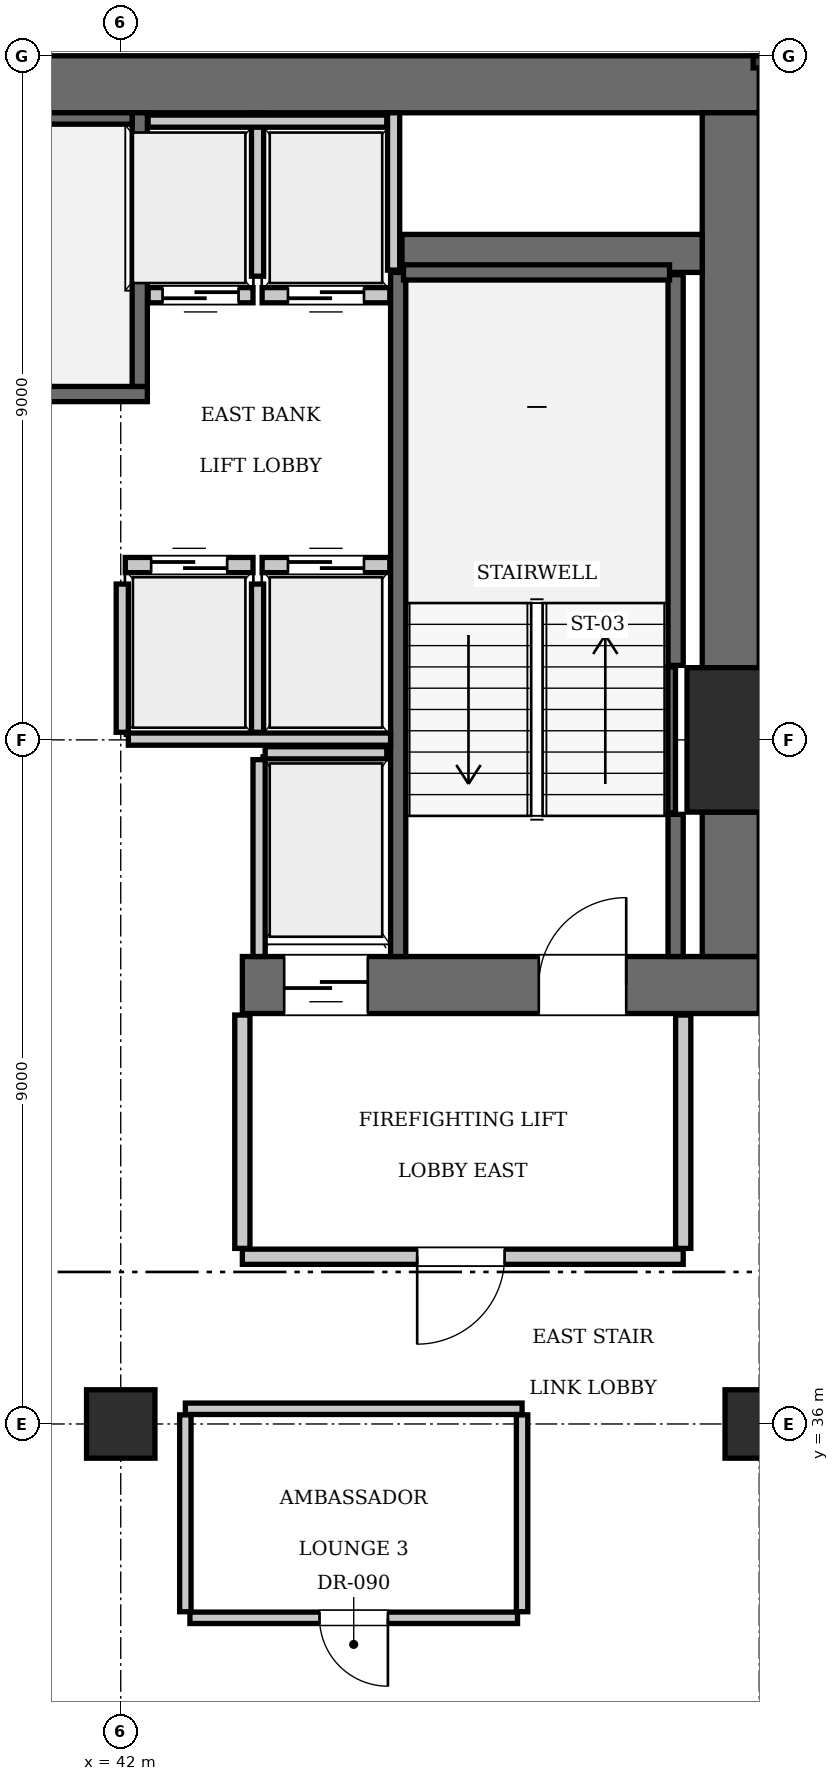
"""IFC4 building model, lengths in metres.
Left out: names, types, materials, properties, quantities, classifications, styles, units other than length and angle.
Written with IfcOpenShell. Run it as: python <this file> out.ifc"""

import sys

from ifc_helpers import new_model, si_unit, direction, frame, frame_2d, origin, origin_2d, place, context, subcontext, project, spatial, rectangle, extrude, element, fill, save


model = new_model("IFC4")
c1 = context("Model", 3, precision=1e-05, world=origin(), true_north=direction((0.0, 1.0)))
c2 = subcontext(c1, "Body", "Model", "MODEL_VIEW")
j1 = project(units=[si_unit("LENGTHUNIT", "METRE"), si_unit("PLANEANGLEUNIT", "RADIAN")], contexts=[c1])
p1 = place(None, origin())
s1 = spatial("IfcSite", under=j1, at=p1, CompositionType="ELEMENT")
p2 = place(p1, origin())
s2 = spatial("IfcBuilding", under=s1, at=p2, CompositionType="ELEMENT")
p3 = place(p2, frame((0.0, 0.0, 219.8)))
s3 = spatial("IfcBuildingStorey", under=s2, at=p3, CompositionType="ELEMENT", Elevation=219.8)
p4 = place(p3, frame((50.4, 45.0, 0.0), z_axis=(0.0, 0.0, 1.0), x_axis=(1.0, 0.0, 0.0)))
e1 = element("IfcColumn", 1, at=p4, inside=s3, PredefinedType="COLUMN", context=c2, shape_type="SweptSolid", body=[
    extrude(rectangle(XDim=1.9, YDim=1.9, at=origin_2d()), origin(), (0.0, 0.0, 1.0), 3.85),
])
p5 = place(p3, frame((25.2, 53.625, 0.0), z_axis=(0.0, 0.0, 1.0), x_axis=(1.0, 0.0, 0.0)))
e2 = element("IfcWall", 2, at=p5, inside=s3, PredefinedType="SHEAR", context=c2, shape_type="SweptSolid", body=[
    extrude(rectangle(XDim=25.2, YDim=0.75, at=frame_2d((12.6, 0.0))), origin(), (0.0, 0.0, 1.0), 3.85),
])
p6 = place(p3, frame((43.6, 41.775, 0.0), z_axis=(0.0, 0.0, 1.0), x_axis=(1.0, 0.0, 0.0)))
e3 = element("IfcWall", 3, at=p6, inside=s3, PredefinedType="SHEAR", context=c2, shape_type="SweptSolid", body=[
    extrude(rectangle(XDim=6.8, YDim=0.75, at=frame_2d((3.4, 0.0))), origin(), (0.0, 0.0, 1.0), 3.85),
])
p7 = place(p6, frame((3.9, 0.0, 0.0)))
e4 = element("IfcOpeningElement", 4, at=p7, cuts=e3, PredefinedType="OPENING", context=c2, shape_type="SweptSolid", body=[
    extrude(rectangle(XDim=1.15, YDim=2.15, at=frame_2d((0.575, 1.075))), frame((0.0, 0.385, 0.0), z_axis=(0.0, -1.0, 0.0), x_axis=(1.0, 0.0, 0.0)), (0.0, 0.0, 1.0), 0.77),
])
p8 = place(p6, frame((0.55, 0.0, 0.0)))
e5 = element("IfcOpeningElement", 5, at=p8, cuts=e3, PredefinedType="OPENING", context=c2, shape_type="SweptSolid", body=[
    extrude(rectangle(XDim=1.1, YDim=2.2, at=frame_2d((0.55, 1.1))), frame((0.0, 0.385, 0.0), z_axis=(0.0, -1.0, 0.0), x_axis=(1.0, 0.0, 0.0)), (0.0, 0.0, 1.0), 0.77),
])
p9 = place(p3, frame((50.025, 42.15, 0.0), z_axis=(0.0, 0.0, 1.0), x_axis=(0.0, 1.0, 0.0)))
e6 = element("IfcWall", 6, at=p9, inside=s3, PredefinedType="SHEAR", context=c2, shape_type="SweptSolid", body=[
    extrude(rectangle(XDim=1.9, YDim=0.75, at=frame_2d((0.95, 0.0))), origin(), (0.0, 0.0, 1.0), 3.85),
])
p10 = place(p3, frame((50.025, 45.95, 0.0), z_axis=(0.0, 0.0, 1.0), x_axis=(0.0, 1.0, 0.0)))
e7 = element("IfcWall", 7, at=p10, inside=s3, PredefinedType="SHEAR", context=c2, shape_type="SweptSolid", body=[
    extrude(rectangle(XDim=7.3, YDim=0.75, at=frame_2d((3.65, 0.0))), origin(), (0.0, 0.0, 1.0), 3.85),
])
p11 = place(p3, frame((45.7, 51.4, 0.0), z_axis=(0.0, 0.0, 1.0), x_axis=(1.0, 0.0, 0.0)))
e8 = element("IfcWall", 8, at=p11, inside=s3, PredefinedType="SHEAR", context=c2, shape_type="SweptSolid", body=[
    extrude(rectangle(XDim=3.95, YDim=0.5, at=frame_2d((1.975, 0.0))), origin(), (0.0, 0.0, 1.0), 3.85),
])
for number, where, z_axis, x_axis in (
    (9, (42.0, 36.0, 0.0), (0.0, 0.0, 1.0), (1.0, 0.0, 0.0)),
    (10, (50.4, 36.0, 0.0), (0.0, 0.0, 1.0), (1.0, 0.0, 0.0)),
):
    element("IfcColumn", number, at=place(p3, frame(where, z_axis=z_axis, x_axis=x_axis)), inside=s3, PredefinedType="COLUMN", context=c2, shape_type="SweptSolid", body=[
        extrude(rectangle(XDim=0.9, YDim=0.9, at=origin_2d()), origin(), (0.0, 0.0, 1.0), 3.85),
    ])
p12 = place(p3, frame((33.25, 49.55, 0.0), z_axis=(0.0, 0.0, 1.0), x_axis=(1.0, 0.0, 0.0)))
e11 = element("IfcWall", 11, at=p12, inside=s3, PredefinedType="SOLIDWALL", context=c2, shape_type="SweptSolid", body=[
    extrude(rectangle(XDim=9.1, YDim=0.2, at=frame_2d((4.55, 0.0))), origin(), (0.0, 0.0, 1.0), 3.61),
])
p13 = place(p3, frame((42.25, 49.65, 0.0), z_axis=(0.0, 0.0, 1.0), x_axis=(0.0, 1.0, 0.0)))
e12 = element("IfcWall", 12, at=p13, inside=s3, PredefinedType="SOLIDWALL", context=c2, shape_type="SweptSolid", body=[
    extrude(rectangle(XDim=3.6, YDim=0.2, at=frame_2d((1.8, 0.0))), origin(), (0.0, 0.0, 1.0), 3.61),
])
p14 = place(p3, frame((33.45, 53.175, 0.0), z_axis=(0.0, 0.0, 1.0), x_axis=(1.0, 0.0, 0.0)))
e13 = element("IfcWall", 13, at=p14, inside=s3, PredefinedType="SOLIDWALL", context=c2, shape_type="SweptSolid", body=[
    extrude(rectangle(XDim=8.7, YDim=0.15, at=frame_2d((4.35, 0.0))), origin(), (0.0, 0.0, 1.0), 3.61),
])
p15 = place(p3, frame((45.65, 42.15, 0.0), z_axis=(0.0, 0.0, 1.0), x_axis=(0.0, 1.0, 0.0)))
e14 = element("IfcWall", 14, at=p15, inside=s3, PredefinedType="SOLIDWALL", context=c2, shape_type="SweptSolid", body=[
    extrude(rectangle(XDim=9.0, YDim=0.2, at=frame_2d((4.5, 0.0))), origin(), (0.0, 0.0, 1.0), 3.61),
])
p16 = place(p3, frame((49.3, 42.15, 0.0), z_axis=(0.0, 0.0, 1.0), x_axis=(0.0, 1.0, 0.0)))
e15 = element("IfcWall", 15, at=p16, inside=s3, PredefinedType="SOLIDWALL", context=c2, shape_type="SweptSolid", body=[
    extrude(rectangle(XDim=1.87, YDim=0.2, at=frame_2d((0.935, 0.0))), origin(), (0.0, 0.0, 1.0), 3.61),
])
p17 = place(p3, frame((49.3, 45.98, 0.0), z_axis=(0.0, 0.0, 1.0), x_axis=(0.0, 1.0, 0.0)))
e16 = element("IfcWall", 16, at=p17, inside=s3, PredefinedType="SOLIDWALL", context=c2, shape_type="SweptSolid", body=[
    extrude(rectangle(XDim=5.14, YDim=0.2, at=frame_2d((2.57, 0.0))), origin(), (0.0, 0.0, 1.0), 3.61),
])
p18 = place(p3, frame((45.72, 51.15, 0.0), z_axis=(0.0, 0.0, 1.0), x_axis=(1.0, 0.0, 0.0)))
e17 = element("IfcWall", 17, at=p18, inside=s3, PredefinedType="SOLIDWALL", context=c2, shape_type="SweptSolid", body=[
    extrude(rectangle(XDim=3.5, YDim=0.2, at=frame_2d((1.75, 0.0))), origin(), (0.0, 0.0, 1.0), 3.61),
])
p19 = place(p3, frame((49.248, 44.04, 0.0), z_axis=(0.0, 0.0, 1.0), x_axis=(0.0, 1.0, 0.0)))
e18 = element("IfcWall", 18, at=p19, inside=s3, PredefinedType="SOLIDWALL", context=c2, shape_type="SweptSolid", body=[
    extrude(rectangle(XDim=1.92, YDim=0.1, at=frame_2d((0.96, 0.0))), origin(), (0.0, 0.0, 1.0), 3.61),
])
p20 = place(p3, frame((42.06, 47.3, 0.0), z_axis=(0.0, 0.0, 1.0), x_axis=(1.0, 0.0, 0.0)))
e19 = element("IfcWall", 19, at=p20, inside=s3, PredefinedType="SOLIDWALL", context=c2, shape_type="SweptSolid", body=[
    extrude(rectangle(XDim=1.68, YDim=0.2, at=frame_2d((0.84, 0.0))), origin(), (0.0, 0.0, 1.0), 3.61),
])
p21 = place(p20, frame((0.34, 0.0, 0.0)))
e20 = element("IfcOpeningElement", 20, at=p21, cuts=e19, PredefinedType="OPENING", context=c2, shape_type="SweptSolid", body=[
    extrude(rectangle(XDim=1.0, YDim=2.15, at=frame_2d((0.5, 1.075))), frame((0.0, 0.11, 0.0), z_axis=(0.0, -1.0, 0.0), x_axis=(1.0, 0.0, 0.0)), (0.0, 0.0, 1.0), 0.22),
])
p22 = place(p3, frame((43.86, 47.3, 0.0), z_axis=(0.0, 0.0, 1.0), x_axis=(1.0, 0.0, 0.0)))
e21 = element("IfcWall", 21, at=p22, inside=s3, PredefinedType="SOLIDWALL", context=c2, shape_type="SweptSolid", body=[
    extrude(rectangle(XDim=1.68, YDim=0.2, at=frame_2d((0.84, 0.0))), origin(), (0.0, 0.0, 1.0), 3.61),
])
p23 = place(p22, frame((0.34, 0.0, 0.0)))
e22 = element("IfcOpeningElement", 22, at=p23, cuts=e21, PredefinedType="OPENING", context=c2, shape_type="SweptSolid", body=[
    extrude(rectangle(XDim=1.0, YDim=2.15, at=frame_2d((0.5, 1.075))), frame((0.0, 0.11, 0.0), z_axis=(0.0, -1.0, 0.0), x_axis=(1.0, 0.0, 0.0)), (0.0, 0.0, 1.0), 0.22),
])
p24 = place(p3, frame((42.36, 50.85, 0.0), z_axis=(0.0, 0.0, 1.0), x_axis=(1.0, 0.0, 0.0)))
e23 = element("IfcWall", 23, at=p24, inside=s3, PredefinedType="SOLIDWALL", context=c2, shape_type="SweptSolid", body=[
    extrude(rectangle(XDim=1.38, YDim=0.2, at=frame_2d((0.69, 0.0))), origin(), (0.0, 0.0, 1.0), 3.61),
])
p25 = place(p24, frame((0.19, 0.0, 0.0)))
e24 = element("IfcOpeningElement", 24, at=p25, cuts=e23, PredefinedType="OPENING", context=c2, shape_type="SweptSolid", body=[
    extrude(rectangle(XDim=1.0, YDim=2.15, at=frame_2d((0.5, 1.075))), frame((0.0, 0.11, 0.0), z_axis=(0.0, -1.0, 0.0), x_axis=(1.0, 0.0, 0.0)), (0.0, 0.0, 1.0), 0.22),
])
p26 = place(p3, frame((43.86, 50.85, 0.0), z_axis=(0.0, 0.0, 1.0), x_axis=(1.0, 0.0, 0.0)))
e25 = element("IfcWall", 25, at=p26, inside=s3, PredefinedType="SOLIDWALL", context=c2, shape_type="SweptSolid", body=[
    extrude(rectangle(XDim=1.68, YDim=0.2, at=frame_2d((0.84, 0.0))), origin(), (0.0, 0.0, 1.0), 3.61),
])
p27 = place(p26, frame((0.34, 0.0, 0.0)))
e26 = element("IfcOpeningElement", 26, at=p27, cuts=e25, PredefinedType="OPENING", context=c2, shape_type="SweptSolid", body=[
    extrude(rectangle(XDim=1.0, YDim=2.15, at=frame_2d((0.5, 1.075))), frame((0.0, 0.11, 0.0), z_axis=(0.0, -1.0, 0.0), x_axis=(1.0, 0.0, 0.0)), (0.0, 0.0, 1.0), 0.22),
])
p28 = place(p3, frame((43.9, 44.83, 0.0), z_axis=(0.0, 0.0, 1.0), x_axis=(1.0, 0.0, 0.0)))
e27 = element("IfcWall", 27, at=p28, inside=s3, PredefinedType="SOLIDWALL", context=c2, shape_type="SweptSolid", body=[
    extrude(rectangle(XDim=1.6, YDim=0.16, at=frame_2d((0.8, 0.0))), origin(), (0.0, 0.0, 1.0), 3.61),
])
p29 = place(p3, frame((43.82, 42.15, 0.0), z_axis=(0.0, 0.0, 1.0), x_axis=(0.0, 1.0, 0.0)))
e28 = element("IfcWall", 28, at=p29, inside=s3, PredefinedType="SOLIDWALL", context=c2, shape_type="SweptSolid", body=[
    extrude(rectangle(XDim=2.59, YDim=0.16, at=frame_2d((1.295, 0.0))), origin(), (0.0, 0.0, 1.0), 3.61),
])
for number, where, z_axis, x_axis in (
    (29, (42.02, 45.1, 0.0), (0.0, 0.0, 1.0), (0.0, 1.0, 0.0)),
    (30, (43.8, 45.1, 0.0), (0.0, 0.0, 1.0), (0.0, 1.0, 0.0)),
):
    element("IfcWall", number, at=place(p3, frame(where, z_axis=z_axis, x_axis=x_axis)), inside=s3, PredefinedType="SOLIDWALL", context=c2, shape_type="SweptSolid", body=[
        extrude(rectangle(XDim=1.95, YDim=0.16, at=frame_2d((0.975, 0.0))), origin(), (0.0, 0.0, 1.0), 3.61),
    ])
p30 = place(p3, frame((42.1, 45.01, 0.0), z_axis=(0.0, 0.0, 1.0), x_axis=(1.0, 0.0, 0.0)))
e31 = element("IfcWall", 31, at=p30, inside=s3, PredefinedType="SOLIDWALL", context=c2, shape_type="SweptSolid", body=[
    extrude(rectangle(XDim=3.45, YDim=0.16, at=frame_2d((1.725, 0.0))), origin(), (0.0, 0.0, 1.0), 3.61),
])
p31 = place(p3, frame((45.59, 51.18, 0.0), z_axis=(0.0, 0.0, 1.0), x_axis=(0.0, 1.0, 0.0)))
e32 = element("IfcWall", 32, at=p31, inside=s3, PredefinedType="SOLIDWALL", context=c2, shape_type="SweptSolid", body=[
    extrude(rectangle(XDim=2.07, YDim=0.16, at=frame_2d((1.035, 0.0))), origin(), (0.0, 0.0, 1.0), 3.61),
])
p32 = place(p3, frame((43.8, 51.1, 0.0), z_axis=(0.0, 0.0, 1.0), x_axis=(0.0, 1.0, 0.0)))
e33 = element("IfcWall", 33, at=p32, inside=s3, PredefinedType="SOLIDWALL", context=c2, shape_type="SweptSolid", body=[
    extrude(rectangle(XDim=2.15, YDim=0.16, at=frame_2d((1.075, 0.0))), origin(), (0.0, 0.0, 1.0), 3.61),
])
p33 = place(p3, frame((42.36, 53.14, 0.0), z_axis=(0.0, 0.0, 1.0), x_axis=(1.0, 0.0, 0.0)))
e34 = element("IfcWall", 34, at=p33, inside=s3, PredefinedType="SOLIDWALL", context=c2, shape_type="SweptSolid", body=[
    extrude(rectangle(XDim=3.14, YDim=0.16, at=frame_2d((1.57, 0.0))), origin(), (0.0, 0.0, 1.0), 3.61),
])
p34 = place(p3, frame((43.6, 38.2, 0.0), z_axis=(0.0, 0.0, 1.0), x_axis=(1.0, 0.0, 0.0)))
e35 = element("IfcWall", 35, at=p34, inside=s3, PredefinedType="PARTITIONING", context=c2, shape_type="SweptSolid", body=[
    extrude(rectangle(XDim=5.8, YDim=0.2, at=frame_2d((2.9, 0.0))), origin(), (0.0, 0.0, 1.0), 3.61),
])
p35 = place(p34, frame((2.3, 0.0, 0.0)))
e36 = element("IfcOpeningElement", 36, at=p35, cuts=e35, PredefinedType="OPENING", context=c2, shape_type="SweptSolid", body=[
    extrude(rectangle(XDim=1.15, YDim=2.15, at=frame_2d((0.575, 1.075))), frame((0.0, 0.11, 0.0), z_axis=(0.0, -1.0, 0.0), x_axis=(1.0, 0.0, 0.0)), (0.0, 0.0, 1.0), 0.22),
])
for number, where, z_axis, x_axis in (
    (37, (43.6, 38.31, 0.0), (0.0, 0.0, 1.0), (0.0, 1.0, 0.0)),
    (38, (49.4, 38.31, 0.0), (0.0, 0.0, 1.0), (0.0, 1.0, 0.0)),
):
    element("IfcWall", number, at=place(p3, frame(where, z_axis=z_axis, x_axis=x_axis)), inside=s3, PredefinedType="PARTITIONING", context=c2, shape_type="SweptSolid", body=[
        extrude(rectangle(XDim=3.07, YDim=0.2, at=frame_2d((1.535, 0.0))), origin(), (0.0, 0.0, 1.0), 3.61),
    ])
p36 = place(p3, frame((42.85, 36.2, 0.0), z_axis=(0.0, 0.0, 1.0), x_axis=(1.0, 0.0, 0.0)))
e39 = element("IfcWall", 39, at=p36, inside=s3, PredefinedType="PARTITIONING", context=c2, shape_type="SweptSolid", body=[
    extrude(rectangle(XDim=4.43, YDim=0.15, at=frame_2d((2.215, 0.0))), origin(), (0.0, 0.0, 1.0), 3.61),
])
for number, where, z_axis, x_axis in (
    (40, (42.85, 33.53, 0.0), (0.0, 0.0, 1.0), (0.0, 1.0, 0.0)),
    (41, (47.28, 33.53, 0.0), (0.0, 0.0, 1.0), (0.0, 1.0, 0.0)),
):
    element("IfcWall", number, at=place(p3, frame(where, z_axis=z_axis, x_axis=x_axis)), inside=s3, PredefinedType="PARTITIONING", context=c2, shape_type="SweptSolid", body=[
        extrude(rectangle(XDim=2.59, YDim=0.15, at=frame_2d((1.295, 0.0))), origin(), (0.0, 0.0, 1.0), 3.61),
    ])
p37 = place(p3, frame((42.91, 33.45, 0.0), z_axis=(0.0, 0.0, 1.0), x_axis=(1.0, 0.0, 0.0)))
e42 = element("IfcWall", 42, at=p37, inside=s3, PredefinedType="PARTITIONING", context=c2, shape_type="SweptSolid", body=[
    extrude(rectangle(XDim=4.31, YDim=0.15, at=frame_2d((2.155, 0.0))), origin(), (0.0, 0.0, 1.0), 3.61),
])
p38 = place(p37, frame((1.705, 0.0, 0.0)))
e43 = element("IfcOpeningElement", 43, at=p38, cuts=e42, PredefinedType="OPENING", context=c2, shape_type="SweptSolid", body=[
    extrude(rectangle(XDim=0.9, YDim=2.1, at=frame_2d((0.45, 1.05))), frame((0.0, 0.085, 0.0), z_axis=(0.0, -1.0, 0.0), x_axis=(1.0, 0.0, 0.0)), (0.0, 0.0, 1.0), 0.17),
])
p39 = place(p7, origin())
e44 = element("IfcDoor", 44, at=p39, inside=s3, OperationType="SINGLE_SWING_RIGHT", PredefinedType="DOOR", context=c2, shape_type="SweptSolid", body=[
    extrude(rectangle(XDim=1.15, YDim=2.15, at=frame_2d((0.575, 1.075))), frame((0.0, 0.025, 0.0), z_axis=(0.0, -1.0, 0.0), x_axis=(1.0, 0.0, 0.0)), (0.0, 0.0, 1.0), 0.05),
])
fill(e4, e44)
p40 = place(p21, origin())
e45 = element("IfcDoor", 45, at=p40, inside=s3, OperationType="SLIDING_TO_LEFT", PredefinedType="DOOR", context=c2, shape_type="SweptSolid", body=[
    extrude(rectangle(XDim=1.0, YDim=2.15, at=frame_2d((0.5, 1.075))), frame((0.0, 0.025, 0.0), z_axis=(0.0, -1.0, 0.0), x_axis=(1.0, 0.0, 0.0)), (0.0, 0.0, 1.0), 0.05),
])
fill(e20, e45)
p41 = place(p23, origin())
e46 = element("IfcDoor", 46, at=p41, inside=s3, OperationType="SLIDING_TO_LEFT", PredefinedType="DOOR", context=c2, shape_type="SweptSolid", body=[
    extrude(rectangle(XDim=1.0, YDim=2.15, at=frame_2d((0.5, 1.075))), frame((0.0, 0.025, 0.0), z_axis=(0.0, -1.0, 0.0), x_axis=(1.0, 0.0, 0.0)), (0.0, 0.0, 1.0), 0.05),
])
fill(e22, e46)
p42 = place(p25, frame((1.0, 0.0, 0.0), z_axis=(0.0, 0.0, 1.0), x_axis=(-1.0, 0.0, 0.0)))
e47 = element("IfcDoor", 47, at=p42, inside=s3, OperationType="SLIDING_TO_LEFT", PredefinedType="DOOR", context=c2, shape_type="SweptSolid", body=[
    extrude(rectangle(XDim=1.0, YDim=2.15, at=frame_2d((0.5, 1.075))), frame((0.0, 0.025, 0.0), z_axis=(0.0, -1.0, 0.0), x_axis=(1.0, 0.0, 0.0)), (0.0, 0.0, 1.0), 0.05),
])
fill(e24, e47)
p43 = place(p27, frame((1.0, 0.0, 0.0), z_axis=(0.0, 0.0, 1.0), x_axis=(-1.0, 0.0, 0.0)))
e48 = element("IfcDoor", 48, at=p43, inside=s3, OperationType="SLIDING_TO_LEFT", PredefinedType="DOOR", context=c2, shape_type="SweptSolid", body=[
    extrude(rectangle(XDim=1.0, YDim=2.15, at=frame_2d((0.5, 1.075))), frame((0.0, 0.025, 0.0), z_axis=(0.0, -1.0, 0.0), x_axis=(1.0, 0.0, 0.0)), (0.0, 0.0, 1.0), 0.05),
])
fill(e26, e48)
p44 = place(p8, frame((1.1, 0.0, 0.0), z_axis=(0.0, 0.0, 1.0), x_axis=(-1.0, 0.0, 0.0)))
e49 = element("IfcDoor", 49, at=p44, inside=s3, OperationType="SLIDING_TO_LEFT", PredefinedType="DOOR", context=c2, shape_type="SweptSolid", body=[
    extrude(rectangle(XDim=1.1, YDim=2.2, at=frame_2d((0.55, 1.1))), frame((0.0, 0.025, 0.0), z_axis=(0.0, -1.0, 0.0), x_axis=(1.0, 0.0, 0.0)), (0.0, 0.0, 1.0), 0.05),
])
fill(e5, e49)
p45 = place(p35, frame((1.15, 0.0, 0.0), z_axis=(0.0, 0.0, 1.0), x_axis=(-1.0, 0.0, 0.0)))
e50 = element("IfcDoor", 50, at=p45, inside=s3, OperationType="SINGLE_SWING_RIGHT", PredefinedType="DOOR", context=c2, shape_type="SweptSolid", body=[
    extrude(rectangle(XDim=1.15, YDim=2.15, at=frame_2d((0.575, 1.075))), frame((0.0, 0.025, 0.0), z_axis=(0.0, -1.0, 0.0), x_axis=(1.0, 0.0, 0.0)), (0.0, 0.0, 1.0), 0.05),
])
fill(e36, e50)
p46 = place(p38, frame((0.9, 0.0, 0.0), z_axis=(0.0, 0.0, 1.0), x_axis=(-1.0, 0.0, 0.0)))
e51 = element("IfcDoor", 51, at=p46, inside=s3, OperationType="SINGLE_SWING_LEFT", PredefinedType="DOOR", context=c2, shape_type="SweptSolid", body=[
    extrude(rectangle(XDim=0.9, YDim=2.1, at=frame_2d((0.45, 1.05))), frame((0.0, 0.025, 0.0), z_axis=(0.0, -1.0, 0.0), x_axis=(1.0, 0.0, 0.0)), (0.0, 0.0, 1.0), 0.05),
])
fill(e43, e51)
save(model, sys.argv[1])
